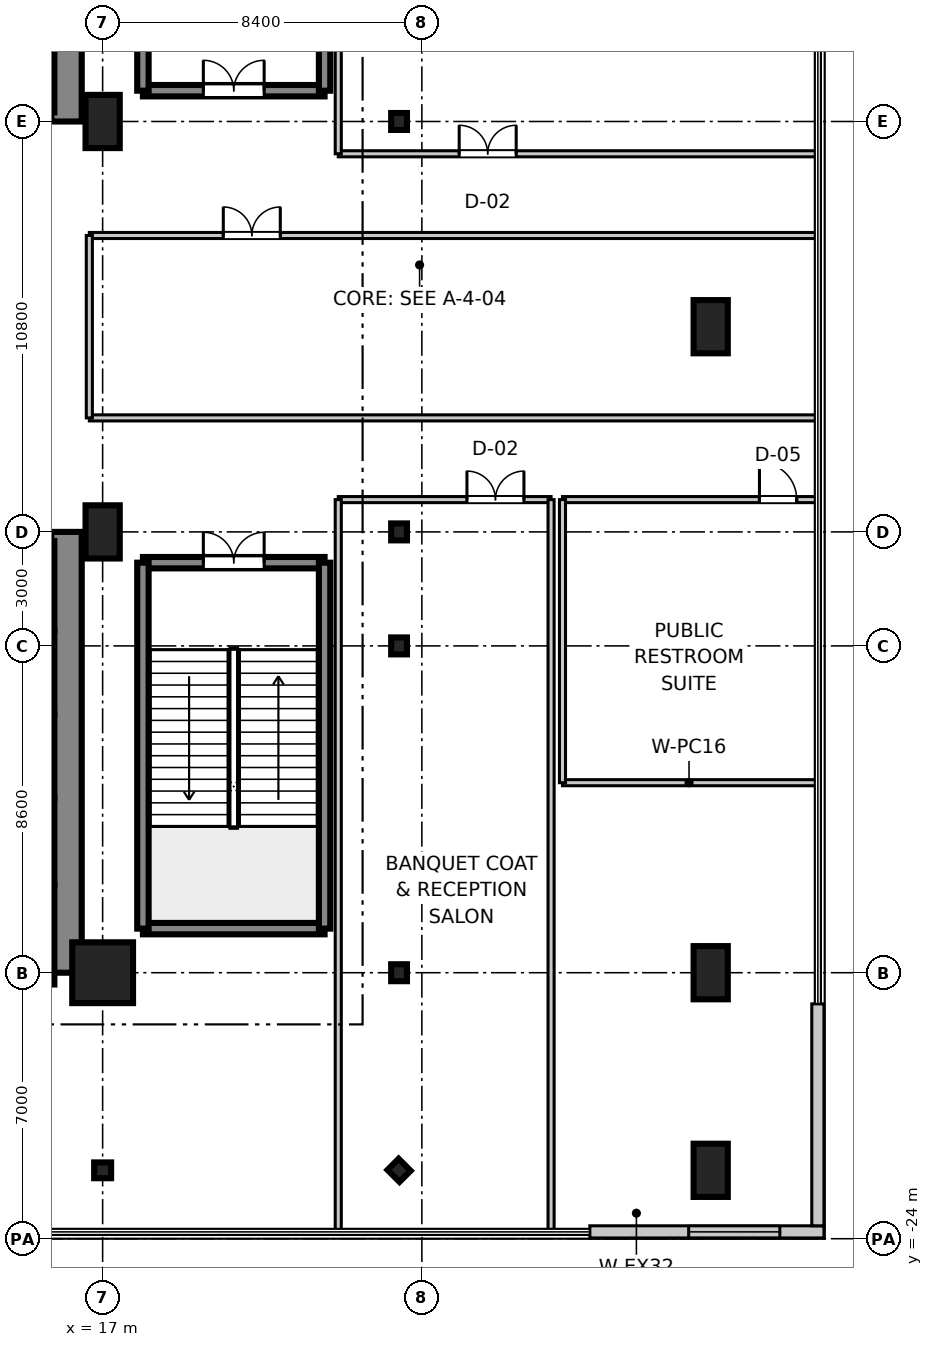
"""IFC4 building model, lengths in metres.
Left out: names, types, materials, properties, quantities, classifications, styles, units other than length and angle.
Written with IfcOpenShell. Run it as: python <this file> out.ifc"""

import sys

from ifc_helpers import new_model, si_unit, direction, frame, frame_2d, origin, origin_2d, place, context, subcontext, project, spatial, rectangle, i_section, extrude, source, transform, mapped, element, fill, save


model = new_model("IFC4")
c1 = context("Model", 3, precision=1e-05, world=origin(), true_north=direction((0.0, 1.0)))
c2 = subcontext(c1, "Body", "Model", "MODEL_VIEW")
j1 = project(units=[si_unit("LENGTHUNIT", "METRE"), si_unit("PLANEANGLEUNIT", "RADIAN")], contexts=[c1])
p1 = place(None, origin())
s1 = spatial("IfcSite", under=j1, at=p1, CompositionType="ELEMENT")
p2 = place(p1, origin())
s2 = spatial("IfcBuilding", under=s1, at=p2, CompositionType="ELEMENT")
p3 = place(p2, frame((0.0, 0.0, 16.2)))
s3 = spatial("IfcBuildingStorey", under=s2, at=p3, CompositionType="ELEMENT", Elevation=16.2)
m1 = source(origin(), c2, "Body", "SweptSolid", [
    extrude(rectangle(XDim=1.6, YDim=1.6, at=origin_2d()), origin(), (0.0, 0.0, 1.0), 5.355),
])
p4 = place(p3, frame((17.0, -17.0, 0.0), z_axis=(0.0, 0.0, 1.0), x_axis=(1.0, 0.0, 0.0)))
e1 = element("IfcColumn", 1, at=p4, inside=s3, PredefinedType="COLUMN", context=c2, shape_type="MappedRepresentation", body=[
    mapped(m1, transform((0.0, 0.0, 0.0), scale=1.0)),
])
m2 = source(origin(), c2, "Body", "SweptSolid", [
    extrude(rectangle(XDim=0.9, YDim=1.4, at=origin_2d()), origin(), (0.0, 0.0, 1.0), 5.355),
])
for number, where, z_axis, x_axis in (
    (2, (17.0, -5.4, 0.0), (0.0, 0.0, 1.0), (1.0, 0.0, 0.0)),
    (3, (17.0, 5.4, 0.0), (0.0, 0.0, 1.0), (1.0, 0.0, 0.0)),
    (4, (33.0, -22.2, 0.0), (0.0, 0.0, 1.0), (1.0, 0.0, 0.0)),
    (5, (33.0, -17.0, 0.0), (0.0, 0.0, 1.0), (1.0, 0.0, 0.0)),
    (6, (33.0, 0.0, 0.0), (0.0, 0.0, 1.0), (1.0, 0.0, 0.0)),
):
    element("IfcColumn", number, at=place(p3, frame(where, z_axis=z_axis, x_axis=x_axis)), inside=s3, PredefinedType="PILASTER", context=c2, shape_type="MappedRepresentation", body=[
        mapped(m2, transform((0.0, 0.0, 0.0), scale=1.0)),
    ])
m3 = source(origin(), c2, "Body", "SweptSolid", [
    extrude(i_section(OverallWidth=0.416, OverallDepth=0.446, WebThickness=0.025, FlangeThickness=0.04, at=origin_2d()), origin(), (0.0, 0.0, 1.0), 5.355),
])
for number, where, z_axis, x_axis in (
    (7, (24.8, -17.0, 0.0), (0.0, 0.0, 1.0), (1.0, 0.0, 0.0)),
    (8, (24.8, -8.4, 0.0), (0.0, 0.0, 1.0), (1.0, 0.0, 0.0)),
    (9, (24.8, -5.4, 0.0), (0.0, 0.0, 1.0), (1.0, 0.0, 0.0)),
    (10, (24.8, 5.4, 0.0), (0.0, 0.0, 1.0), (1.0, 0.0, 0.0)),
    (11, (17.0, -22.2, 0.0), (0.0, 0.0, 1.0), (0.0, 1.0, 0.0)),
    (12, (24.8, -22.2, 0.0), (0.0, 0.0, 1.0), (0.707, 0.707, 0.0)),
):
    element("IfcColumn", number, at=place(p3, frame(where, z_axis=z_axis, x_axis=x_axis)), inside=s3, PredefinedType="COLUMN", context=c2, shape_type="MappedRepresentation", body=[
        mapped(m3, transform((0.0, 0.0, 0.0), scale=1.0)),
    ])
m4 = source(origin(), c2, "Body", "SweptSolid", [
    extrude(rectangle(XDim=11.6, YDim=0.8, at=frame_2d((5.8, 0.0))), origin(), (0.0, 0.0, 1.0), 5.08),
])
for number, where, z_axis, x_axis in (
    (13, (16.05, 5.4, 0.0), (0.0, 0.0, 1.0), (0.0, 1.0, 0.0)),
    (14, (16.05, -17.0, 0.0), (0.0, 0.0, 1.0), (0.0, 1.0, 0.0)),
):
    element("IfcWall", number, at=place(p3, frame(where, z_axis=z_axis, x_axis=x_axis)), inside=s3, PredefinedType="SHEAR", context=c2, shape_type="MappedRepresentation", body=[
        mapped(m4, transform((0.0, 0.0, 0.0), scale=1.0)),
    ])
m5 = source(origin(), c2, "Body", "SweptSolid", [
    extrude(rectangle(XDim=4.78, YDim=0.3, at=frame_2d((2.39, 0.0))), origin(), (0.0, 0.0, 1.0), 5.08),
])
p5 = place(p3, frame((18.06, 6.21, 0.0), z_axis=(0.0, 0.0, 1.0), x_axis=(1.0, 0.0, 0.0)))
e15 = element("IfcWall", 15, at=p5, inside=s3, PredefinedType="SHEAR", context=c2, shape_type="MappedRepresentation", body=[
    mapped(m5, transform((0.0, 0.0, 0.0), scale=1.0)),
])
p6 = place(p5, frame((1.59, 0.0, 0.0)))
e16 = element("IfcOpeningElement", 16, at=p6, cuts=e15, PredefinedType="OPENING", context=c2, shape_type="SweptSolid", body=[
    extrude(rectangle(XDim=1.6, YDim=2.2, at=frame_2d((0.8, 1.1))), frame((0.0, 0.16, 0.0), z_axis=(0.0, -1.0, 0.0), x_axis=(1.0, 0.0, 0.0)), (0.0, 0.0, 1.0), 0.32),
])
m6 = source(origin(), c2, "Body", "SweptSolid", [
    extrude(rectangle(XDim=9.63, YDim=0.3, at=frame_2d((4.815, 0.0))), origin(), (0.0, 0.0, 1.0), 5.08),
])
for number, where, z_axis, x_axis in (
    (17, (18.06, 6.21, 0.0), (0.0, 0.0, 1.0), (0.0, 1.0, 0.0)),
    (18, (22.84, 6.21, 0.0), (0.0, 0.0, 1.0), (0.0, 1.0, 0.0)),
):
    element("IfcWall", number, at=place(p3, frame(where, z_axis=z_axis, x_axis=x_axis)), inside=s3, PredefinedType="SHEAR", context=c2, shape_type="MappedRepresentation", body=[
        mapped(m6, transform((0.0, 0.0, 0.0), scale=1.0)),
    ])
p7 = place(p3, frame((18.06, -15.84, 0.0), z_axis=(0.0, 0.0, 1.0), x_axis=(1.0, 0.0, 0.0)))
e19 = element("IfcWall", 19, at=p7, inside=s3, PredefinedType="SHEAR", context=c2, shape_type="MappedRepresentation", body=[
    mapped(m5, transform((0.0, 0.0, 0.0), scale=1.0)),
])
p8 = place(p3, frame((18.06, -6.21, 0.0), z_axis=(0.0, 0.0, 1.0), x_axis=(1.0, 0.0, 0.0)))
e20 = element("IfcWall", 20, at=p8, inside=s3, PredefinedType="SHEAR", context=c2, shape_type="MappedRepresentation", body=[
    mapped(m5, transform((0.0, 0.0, 0.0), scale=1.0)),
])
p9 = place(p8, frame((1.59, 0.0, 0.0)))
e21 = element("IfcOpeningElement", 21, at=p9, cuts=e20, PredefinedType="OPENING", context=c2, shape_type="SweptSolid", body=[
    extrude(rectangle(XDim=1.6, YDim=2.2, at=frame_2d((0.8, 1.1))), frame((0.0, 0.16, 0.0), z_axis=(0.0, -1.0, 0.0), x_axis=(1.0, 0.0, 0.0)), (0.0, 0.0, 1.0), 0.32),
])
for number, where, z_axis, x_axis in (
    (22, (18.06, -15.84, 0.0), (0.0, 0.0, 1.0), (0.0, 1.0, 0.0)),
    (23, (22.84, -15.84, 0.0), (0.0, 0.0, 1.0), (0.0, 1.0, 0.0)),
):
    element("IfcWall", number, at=place(p3, frame(where, z_axis=z_axis, x_axis=x_axis)), inside=s3, PredefinedType="SHEAR", context=c2, shape_type="MappedRepresentation", body=[
        mapped(m6, transform((0.0, 0.0, 0.0), scale=1.0)),
    ])
m7 = source(origin(), c2, "Body", "SweptSolid", [
    extrude(rectangle(XDim=2.36, YDim=0.22, at=frame_2d((1.18, 0.0))), origin(), (0.0, 0.0, 1.0), 5.08),
])
for number, where, z_axis, x_axis in (
    (24, (15.62, 5.64, 0.0), (0.0, 0.0, 1.0), (0.0, 1.0, 0.0)),
    (25, (15.62, -8.0, 0.0), (0.0, 0.0, 1.0), (0.0, 1.0, 0.0)),
):
    element("IfcWall", number, at=place(p3, frame(where, z_axis=z_axis, x_axis=x_axis)), inside=s3, PredefinedType="SHEAR", context=c2, shape_type="MappedRepresentation", body=[
        mapped(m7, transform((0.0, 0.0, 0.0), scale=1.0)),
    ])
m8 = source(origin(), c2, "Body", "SweptSolid", [
    extrude(rectangle(XDim=2.2, YDim=0.22, at=frame_2d((1.1, 0.0))), origin(), (0.0, 0.0, 1.0), 5.08),
])
for number, where, z_axis, x_axis in (
    (26, (15.62, -10.2, 0.0), (0.0, 0.0, 1.0), (0.0, 1.0, 0.0)),
    (27, (15.62, -12.4, 0.0), (0.0, 0.0, 1.0), (0.0, 1.0, 0.0)),
):
    element("IfcWall", number, at=place(p3, frame(where, z_axis=z_axis, x_axis=x_axis)), inside=s3, PredefinedType="SHEAR", context=c2, shape_type="MappedRepresentation", body=[
        mapped(m8, transform((0.0, 0.0, 0.0), scale=1.0)),
    ])
m9 = source(origin(), c2, "Body", "SweptSolid", [
    extrude(rectangle(XDim=2.3, YDim=0.22, at=frame_2d((1.15, 0.0))), origin(), (0.0, 0.0, 1.0), 5.08),
])
p10 = place(p3, frame((15.62, -14.7, 0.0), z_axis=(0.0, 0.0, 1.0), x_axis=(0.0, 1.0, 0.0)))
e28 = element("IfcWall", 28, at=p10, inside=s3, PredefinedType="SHEAR", context=c2, shape_type="MappedRepresentation", body=[
    mapped(m9, transform((0.0, 0.0, 0.0), scale=1.0)),
])
m10 = source(origin(), c2, "Body", "SweptSolid", [
    extrude(rectangle(XDim=2.61, YDim=0.22, at=frame_2d((1.305, 0.0))), origin(), (0.0, 0.0, 1.0), 5.08),
])
p11 = place(p3, frame((15.62, -17.31, 0.0), z_axis=(0.0, 0.0, 1.0), x_axis=(0.0, 1.0, 0.0)))
e29 = element("IfcWall", 29, at=p11, inside=s3, PredefinedType="SHEAR", context=c2, shape_type="MappedRepresentation", body=[
    mapped(m10, transform((0.0, 0.0, 0.0), scale=1.0)),
])
m11 = source(origin(), c2, "Body", "SweptSolid", [
    extrude(rectangle(XDim=6.16, YDim=0.32, at=frame_2d((3.08, 0.0))), origin(), (0.0, 0.0, 1.0), 5.08),
])
p12 = place(p3, frame((29.82, -23.82, 0.0), z_axis=(0.0, 0.0, 1.0), x_axis=(1.0, 0.0, 0.0)))
e30 = element("IfcWall", 30, at=p12, inside=s3, PredefinedType="STANDARD", context=c2, shape_type="MappedRepresentation", body=[
    mapped(m11, transform((0.0, 0.0, 0.0), scale=1.0)),
])
p13 = place(p12, frame((2.6, 0.0, 0.9)))
e31 = element("IfcOpeningElement", 31, at=p13, cuts=e30, PredefinedType="OPENING", context=c2, shape_type="SweptSolid", body=[
    extrude(rectangle(XDim=2.4, YDim=2.2, at=frame_2d((1.2, 1.1))), frame((0.0, 0.17, 0.0), z_axis=(0.0, -1.0, 0.0), x_axis=(1.0, 0.0, 0.0)), (0.0, 0.0, 1.0), 0.34),
])
m12 = source(origin(), c2, "Body", "SweptSolid", [
    extrude(rectangle(XDim=5.84, YDim=0.32, at=frame_2d((2.92, 0.0))), origin(), (0.0, 0.0, 1.0), 5.08),
])
p14 = place(p3, frame((35.82, -23.66, 0.0), z_axis=(0.0, 0.0, 1.0), x_axis=(0.0, 1.0, 0.0)))
e32 = element("IfcWall", 32, at=p14, inside=s3, PredefinedType="STANDARD", context=c2, shape_type="MappedRepresentation", body=[
    mapped(m12, transform((0.0, 0.0, 0.0), scale=1.0)),
])
m13 = source(origin(), c2, "Body", "SweptSolid", [
    extrude(rectangle(XDim=19.11, YDim=0.16, at=frame_2d((9.555, 0.0))), origin(), (0.0, 0.0, 1.0), 3.4),
])
p15 = place(p3, frame((16.65, -2.4, 0.0), z_axis=(0.0, 0.0, 1.0), x_axis=(1.0, 0.0, 0.0)))
e33 = element("IfcWall", 33, at=p15, inside=s3, PredefinedType="PARTITIONING", context=c2, shape_type="MappedRepresentation", body=[
    mapped(m13, transform((0.0, 0.0, 0.0), scale=1.0)),
])
p16 = place(p3, frame((16.65, 2.4, 0.0), z_axis=(0.0, 0.0, 1.0), x_axis=(1.0, 0.0, 0.0)))
e34 = element("IfcWall", 34, at=p16, inside=s3, PredefinedType="PARTITIONING", context=c2, shape_type="MappedRepresentation", body=[
    mapped(m13, transform((0.0, 0.0, 0.0), scale=1.0)),
])
p17 = place(p16, frame((3.525, 0.0, 0.0)))
e35 = element("IfcOpeningElement", 35, at=p17, cuts=e34, PredefinedType="OPENING", context=c2, shape_type="SweptSolid", body=[
    extrude(rectangle(XDim=1.5, YDim=2.15, at=frame_2d((0.75, 1.075))), frame((0.0, 0.09, 0.0), z_axis=(0.0, -1.0, 0.0), x_axis=(1.0, 0.0, 0.0)), (0.0, 0.0, 1.0), 0.18),
])
m14 = source(origin(), c2, "Body", "SweptSolid", [
    extrude(rectangle(XDim=4.8, YDim=0.16, at=frame_2d((2.4, 0.0))), origin(), (0.0, 0.0, 1.0), 3.4),
])
p18 = place(p3, frame((16.65, -2.4, 0.0), z_axis=(0.0, 0.0, 1.0), x_axis=(0.0, 1.0, 0.0)))
e36 = element("IfcWall", 36, at=p18, inside=s3, PredefinedType="PARTITIONING", context=c2, shape_type="MappedRepresentation", body=[
    mapped(m14, transform((0.0, 0.0, 0.0), scale=1.0)),
])
m15 = source(origin(), c2, "Body", "SweptSolid", [
    extrude(rectangle(XDim=12.56, YDim=0.16, at=frame_2d((6.28, 0.0))), origin(), (0.0, 0.0, 1.0), 3.4),
])
p19 = place(p3, frame((23.2, 4.55, 0.0), z_axis=(0.0, 0.0, 1.0), x_axis=(1.0, 0.0, 0.0)))
e37 = element("IfcWall", 37, at=p19, inside=s3, PredefinedType="PARTITIONING", context=c2, shape_type="MappedRepresentation", body=[
    mapped(m15, transform((0.0, 0.0, 0.0), scale=1.0)),
])
p20 = place(p19, frame((3.182, 0.0, 0.0)))
e38 = element("IfcOpeningElement", 38, at=p20, cuts=e37, PredefinedType="OPENING", context=c2, shape_type="SweptSolid", body=[
    extrude(rectangle(XDim=1.5, YDim=2.15, at=frame_2d((0.75, 1.075))), frame((0.0, 0.09, 0.0), z_axis=(0.0, -1.0, 0.0), x_axis=(1.0, 0.0, 0.0)), (0.0, 0.0, 1.0), 0.18),
])
m16 = source(origin(), c2, "Body", "SweptSolid", [
    extrude(rectangle(XDim=19.21, YDim=0.16, at=frame_2d((9.605, 0.0))), origin(), (0.0, 0.0, 1.0), 3.4),
])
p21 = place(p3, frame((23.2, 4.55, 0.0), z_axis=(0.0, 0.0, 1.0), x_axis=(0.0, 1.0, 0.0)))
e39 = element("IfcWall", 39, at=p21, inside=s3, PredefinedType="PARTITIONING", context=c2, shape_type="MappedRepresentation", body=[
    mapped(m16, transform((0.0, 0.0, 0.0), scale=1.0)),
])
m17 = source(origin(), c2, "Body", "SweptSolid", [
    extrude(rectangle(XDim=5.6, YDim=0.16, at=frame_2d((2.8, 0.0))), origin(), (0.0, 0.0, 1.0), 3.4),
])
p22 = place(p3, frame((23.2, -4.55, 0.0), z_axis=(0.0, 0.0, 1.0), x_axis=(1.0, 0.0, 0.0)))
e40 = element("IfcWall", 40, at=p22, inside=s3, PredefinedType="PARTITIONING", context=c2, shape_type="MappedRepresentation", body=[
    mapped(m17, transform((0.0, 0.0, 0.0), scale=1.0)),
])
p23 = place(p22, frame((3.386, 0.0, 0.0)))
e41 = element("IfcOpeningElement", 41, at=p23, cuts=e40, PredefinedType="OPENING", context=c2, shape_type="SweptSolid", body=[
    extrude(rectangle(XDim=1.5, YDim=2.15, at=frame_2d((0.75, 1.075))), frame((0.0, 0.09, 0.0), z_axis=(0.0, -1.0, 0.0), x_axis=(1.0, 0.0, 0.0)), (0.0, 0.0, 1.0), 0.18),
])
for number, where, z_axis, x_axis in (
    (42, (23.2, -23.76, 0.0), (0.0, 0.0, 1.0), (0.0, 1.0, 0.0)),
    (43, (28.8, -23.76, 0.0), (0.0, 0.0, 1.0), (0.0, 1.0, 0.0)),
):
    element("IfcWall", number, at=place(p3, frame(where, z_axis=z_axis, x_axis=x_axis)), inside=s3, PredefinedType="PARTITIONING", context=c2, shape_type="MappedRepresentation", body=[
        mapped(m16, transform((0.0, 0.0, 0.0), scale=1.0)),
    ])
m18 = source(origin(), c2, "Body", "SweptSolid", [
    extrude(rectangle(XDim=6.66, YDim=0.16, at=frame_2d((3.33, 0.0))), origin(), (0.0, 0.0, 1.0), 3.4),
])
p24 = place(p3, frame((29.1, -12.0, 0.0), z_axis=(0.0, 0.0, 1.0), x_axis=(1.0, 0.0, 0.0)))
e44 = element("IfcWall", 44, at=p24, inside=s3, PredefinedType="PARTITIONING", context=c2, shape_type="MappedRepresentation", body=[
    mapped(m18, transform((0.0, 0.0, 0.0), scale=1.0)),
])
p25 = place(p3, frame((29.1, -4.55, 0.0), z_axis=(0.0, 0.0, 1.0), x_axis=(1.0, 0.0, 0.0)))
e45 = element("IfcWall", 45, at=p25, inside=s3, PredefinedType="PARTITIONING", context=c2, shape_type="MappedRepresentation", body=[
    mapped(m18, transform((0.0, 0.0, 0.0), scale=1.0)),
])
p26 = place(p25, frame((5.183, 0.0, 0.0)))
e46 = element("IfcOpeningElement", 46, at=p26, cuts=e45, PredefinedType="OPENING", context=c2, shape_type="SweptSolid", body=[
    extrude(rectangle(XDim=0.98, YDim=2.1, at=frame_2d((0.49, 1.05))), frame((0.0, 0.09, 0.0), z_axis=(0.0, -1.0, 0.0), x_axis=(1.0, 0.0, 0.0)), (0.0, 0.0, 1.0), 0.18),
])
m19 = source(origin(), c2, "Body", "SweptSolid", [
    extrude(rectangle(XDim=7.45, YDim=0.16, at=frame_2d((3.725, 0.0))), origin(), (0.0, 0.0, 1.0), 3.4),
])
p27 = place(p3, frame((29.1, -12.0, 0.0), z_axis=(0.0, 0.0, 1.0), x_axis=(0.0, 1.0, 0.0)))
e47 = element("IfcWall", 47, at=p27, inside=s3, PredefinedType="PARTITIONING", context=c2, shape_type="MappedRepresentation", body=[
    mapped(m19, transform((0.0, 0.0, 0.0), scale=1.0)),
])
m20 = source(origin(), c2, "Body", "SweptSolid", [
    extrude(rectangle(XDim=1.6, YDim=2.2, at=frame_2d((0.8, 1.1))), frame((0.0, 0.025, 0.0), z_axis=(0.0, -1.0, 0.0), x_axis=(1.0, 0.0, 0.0)), (0.0, 0.0, 1.0), 0.05),
])
p28 = place(p6, origin())
e48 = element("IfcDoor", 48, at=p28, inside=s3, OperationType="DOUBLE_DOOR_SINGLE_SWING", PredefinedType="DOOR", context=c2, shape_type="MappedRepresentation", body=[
    mapped(m20, transform((0.0, 0.0, 0.0), scale=1.0)),
])
fill(e16, e48)
p29 = place(p9, frame((1.6, 0.0, 0.0), z_axis=(0.0, 0.0, 1.0), x_axis=(-1.0, 0.0, 0.0)))
e49 = element("IfcDoor", 49, at=p29, inside=s3, OperationType="DOUBLE_DOOR_SINGLE_SWING", PredefinedType="DOOR", context=c2, shape_type="MappedRepresentation", body=[
    mapped(m20, transform((0.0, 0.0, 0.0), scale=1.0)),
])
fill(e21, e49)
m21 = source(origin(), c2, "Body", "SweptSolid", [
    extrude(rectangle(XDim=2.4, YDim=2.2, at=frame_2d((1.2, 1.1))), frame((0.0, 0.03, 0.0), z_axis=(0.0, -1.0, 0.0), x_axis=(1.0, 0.0, 0.0)), (0.0, 0.0, 1.0), 0.06),
])
p30 = place(p13, origin())
e50 = element("IfcWindow", 50, at=p30, inside=s3, PartitioningType="SINGLE_PANEL", PredefinedType="WINDOW", context=c2, shape_type="MappedRepresentation", body=[
    mapped(m21, transform((0.0, 0.0, 0.0), scale=1.0)),
])
fill(e31, e50)
m22 = source(origin(), c2, "Body", "SweptSolid", [
    extrude(rectangle(XDim=1.5, YDim=2.15, at=frame_2d((0.75, 1.075))), frame((0.0, 0.025, 0.0), z_axis=(0.0, -1.0, 0.0), x_axis=(1.0, 0.0, 0.0)), (0.0, 0.0, 1.0), 0.05),
])
p31 = place(p17, frame((1.5, 0.0, 0.0), z_axis=(0.0, 0.0, 1.0), x_axis=(-1.0, 0.0, 0.0)))
e51 = element("IfcDoor", 51, at=p31, inside=s3, OperationType="DOUBLE_DOOR_SINGLE_SWING", PredefinedType="DOOR", context=c2, shape_type="MappedRepresentation", body=[
    mapped(m22, transform((0.0, 0.0, 0.0), scale=1.0)),
])
fill(e35, e51)
p32 = place(p20, origin())
e52 = element("IfcDoor", 52, at=p32, inside=s3, OperationType="DOUBLE_DOOR_SINGLE_SWING", PredefinedType="DOOR", context=c2, shape_type="MappedRepresentation", body=[
    mapped(m22, transform((0.0, 0.0, 0.0), scale=1.0)),
])
fill(e38, e52)
p33 = place(p23, frame((1.5, 0.0, 0.0), z_axis=(0.0, 0.0, 1.0), x_axis=(-1.0, 0.0, 0.0)))
e53 = element("IfcDoor", 53, at=p33, inside=s3, OperationType="DOUBLE_DOOR_SINGLE_SWING", PredefinedType="DOOR", context=c2, shape_type="MappedRepresentation", body=[
    mapped(m22, transform((0.0, 0.0, 0.0), scale=1.0)),
])
fill(e41, e53)
m23 = source(origin(), c2, "Body", "SweptSolid", [
    extrude(rectangle(XDim=0.98, YDim=2.1, at=frame_2d((0.49, 1.05))), frame((0.0, 0.025, 0.0), z_axis=(0.0, -1.0, 0.0), x_axis=(1.0, 0.0, 0.0)), (0.0, 0.0, 1.0), 0.05),
])
p34 = place(p26, frame((0.98, 0.0, 0.0), z_axis=(0.0, 0.0, 1.0), x_axis=(-1.0, 0.0, 0.0)))
e54 = element("IfcDoor", 54, at=p34, inside=s3, OperationType="SINGLE_SWING_LEFT", PredefinedType="DOOR", context=c2, shape_type="MappedRepresentation", body=[
    mapped(m23, transform((0.0, 0.0, 0.0), scale=1.0)),
])
fill(e46, e54)
save(model, sys.argv[1])
